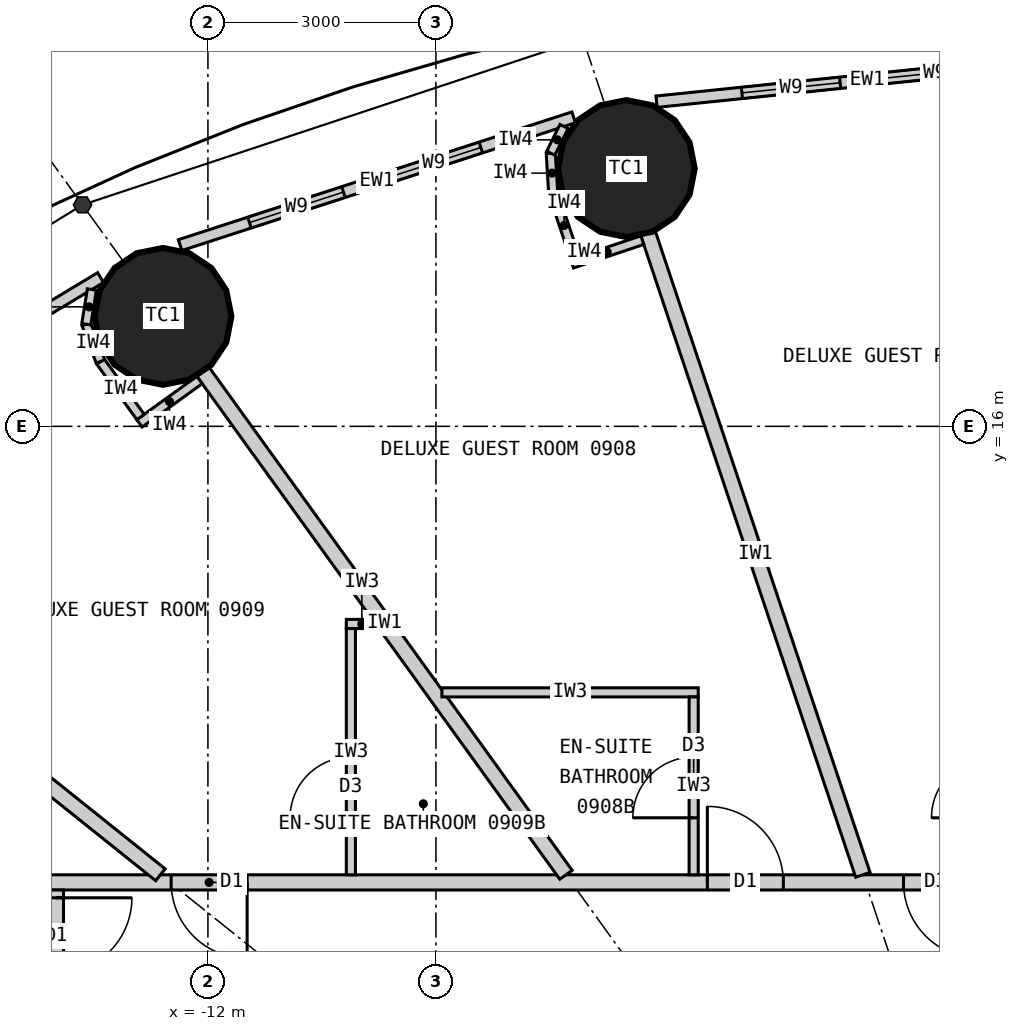
"""IFC4 building model, lengths in metres.
Left out: names, types, materials, properties, quantities, classifications, styles, units other than length and angle.
Written with IfcOpenShell. Run it as: python <this file> out.ifc"""

import sys

from ifc_helpers import new_model, si_unit, direction, frame, frame_2d, origin, origin_2d, place, context, subcontext, project, spatial, rectangle, circle, extrude, element, fill, save


model = new_model("IFC4")
c1 = context("Model", 3, precision=1e-05, world=origin(), true_north=direction((0.0, 1.0)))
c2 = subcontext(c1, "Body", "Model", "MODEL_VIEW")
j1 = project(units=[si_unit("LENGTHUNIT", "METRE"), si_unit("PLANEANGLEUNIT", "RADIAN")], contexts=[c1])
p1 = place(None, origin())
s1 = spatial("IfcSite", under=j1, at=p1, CompositionType="ELEMENT")
p2 = place(p1, origin())
s2 = spatial("IfcBuilding", under=s1, at=p2, CompositionType="ELEMENT")
p3 = place(p2, frame((0.0, 0.0, 42.6)))
s3 = spatial("IfcBuildingStorey", under=s2, at=p3, CompositionType="ELEMENT", Elevation=42.6)
for number, where, z_axis, x_axis in (
    (1, (-6.495, 19.391, 0.0), (0.0, 0.0, 1.0), (1.0, 0.0, 0.0)),
    (2, (-12.591, 17.447, 0.0), (0.0, 0.0, 1.0), (1.0, 0.0, 0.0)),
):
    element("IfcColumn", number, at=place(p3, frame(where, z_axis=z_axis, x_axis=x_axis)), inside=s3, PredefinedType="COLUMN", context=c2, shape_type="SweptSolid", body=[
        extrude(circle(Radius=0.9, at=origin_2d()), origin(), (0.0, 0.0, 1.0), 3.3),
    ])
p4 = place(p3, frame((-0.551, 20.843, 0.0), z_axis=(0.0, 0.0, 1.0), x_axis=(-0.994723735084, -0.102589915983, 0.0)))
e3 = element("IfcWall", 3, at=p4, inside=s3, PredefinedType="ELEMENTEDWALL", context=c2, shape_type="SweptSolid", body=[
    extrude(rectangle(XDim=5.576, YDim=0.15, at=frame_2d((2.788, 0.0))), origin(), (0.0, 0.0, 1.0), 3.05),
])
p5 = place(p4, frame((1.247, 0.0, 0.9)))
e4 = element("IfcOpeningElement", 4, at=p5, cuts=e3, PredefinedType="OPENING", context=c2, shape_type="SweptSolid", body=[
    extrude(rectangle(XDim=1.3, YDim=1.9, at=frame_2d((0.65, 0.95))), frame((0.0, 0.085, 0.0), z_axis=(0.0, -1.0, 0.0), x_axis=(1.0, 0.0, 0.0)), (0.0, 0.0, 1.0), 0.17),
])
p6 = place(p4, frame((3.147, 0.0, 0.9)))
e5 = element("IfcOpeningElement", 5, at=p6, cuts=e3, PredefinedType="OPENING", context=c2, shape_type="SweptSolid", body=[
    extrude(rectangle(XDim=1.3, YDim=1.9, at=frame_2d((0.65, 0.95))), frame((0.0, 0.085, 0.0), z_axis=(0.0, -1.0, 0.0), x_axis=(1.0, 0.0, 0.0)), (0.0, 0.0, 1.0), 0.17),
])
p7 = place(p3, frame((-7.188, 20.065, 0.0), z_axis=(0.0, 0.0, 1.0), x_axis=(-0.951138486029, -0.308764603532, 0.0)))
e6 = element("IfcWall", 6, at=p7, inside=s3, PredefinedType="ELEMENTEDWALL", context=c2, shape_type="SweptSolid", body=[
    extrude(rectangle(XDim=5.444, YDim=0.15, at=frame_2d((2.722, 0.0))), origin(), (0.0, 0.0, 1.0), 3.05),
])
p8 = place(p7, frame((1.284, 0.0, 0.9)))
e7 = element("IfcOpeningElement", 7, at=p8, cuts=e6, PredefinedType="OPENING", context=c2, shape_type="SweptSolid", body=[
    extrude(rectangle(XDim=1.3, YDim=1.9, at=frame_2d((0.65, 0.95))), frame((0.0, 0.085, 0.0), z_axis=(0.0, -1.0, 0.0), x_axis=(1.0, 0.0, 0.0)), (0.0, 0.0, 1.0), 0.17),
])
p9 = place(p7, frame((3.184, 0.0, 0.9)))
e8 = element("IfcOpeningElement", 8, at=p9, cuts=e6, PredefinedType="OPENING", context=c2, shape_type="SweptSolid", body=[
    extrude(rectangle(XDim=1.3, YDim=1.9, at=frame_2d((0.65, 0.95))), frame((0.0, 0.085, 0.0), z_axis=(0.0, -1.0, 0.0), x_axis=(1.0, 0.0, 0.0)), (0.0, 0.0, 1.0), 0.17),
])
p10 = place(p3, frame((-13.412, 17.957, 0.0), z_axis=(0.0, 0.0, 1.0), x_axis=(-0.856958191554, -0.515385931054, 0.0)))
e9 = element("IfcWall", 9, at=p10, inside=s3, PredefinedType="ELEMENTEDWALL", context=c2, shape_type="SweptSolid", body=[
    extrude(rectangle(XDim=5.201, YDim=0.15, at=frame_2d((2.601, 0.0))), origin(), (0.0, 0.0, 1.0), 3.05),
])
p11 = place(p10, frame((1.225, 0.0, 0.9)))
e10 = element("IfcOpeningElement", 10, at=p11, cuts=e9, PredefinedType="OPENING", context=c2, shape_type="SweptSolid", body=[
    extrude(rectangle(XDim=1.3, YDim=1.9, at=frame_2d((0.65, 0.95))), frame((0.0, 0.085, 0.0), z_axis=(0.0, -1.0, 0.0), x_axis=(1.0, 0.0, 0.0)), (0.0, 0.0, 1.0), 0.17),
])
p12 = place(p10, frame((3.125, 0.0, 0.9)))
e11 = element("IfcOpeningElement", 11, at=p12, cuts=e9, PredefinedType="OPENING", context=c2, shape_type="SweptSolid", body=[
    extrude(rectangle(XDim=1.3, YDim=1.9, at=frame_2d((0.65, 0.95))), frame((0.0, 0.085, 0.0), z_axis=(0.0, -1.0, 0.0), x_axis=(1.0, 0.0, 0.0)), (0.0, 0.0, 1.0), 0.17),
])
p13 = place(p3, frame((-14.1, 10.0, 0.0), z_axis=(0.0, 0.0, 1.0), x_axis=(1.0, 0.0, 0.0)))
e12 = element("IfcWall", 12, at=p13, inside=s3, PredefinedType="PARTITIONING", context=c2, shape_type="SweptSolid", body=[
    extrude(rectangle(XDim=28.2, YDim=0.2, at=frame_2d((14.1, 0.0))), origin(), (0.0, 0.0, 1.0), 3.05),
])
p14 = place(p13, frame((23.477, 0.0, 0.0)))
e13 = element("IfcOpeningElement", 13, at=p14, cuts=e12, PredefinedType="OPENING", context=c2, shape_type="SweptSolid", body=[
    extrude(rectangle(XDim=1.0, YDim=2.2, at=frame_2d((0.5, 1.1))), frame((0.0, 0.11, 0.0), z_axis=(0.0, -1.0, 0.0), x_axis=(1.0, 0.0, 0.0)), (0.0, 0.0, 1.0), 0.22),
])
p15 = place(p13, frame((18.529, 0.0, 0.0)))
e14 = element("IfcOpeningElement", 14, at=p15, cuts=e12, PredefinedType="OPENING", context=c2, shape_type="SweptSolid", body=[
    extrude(rectangle(XDim=1.0, YDim=2.2, at=frame_2d((0.5, 1.1))), frame((0.0, 0.11, 0.0), z_axis=(0.0, -1.0, 0.0), x_axis=(1.0, 0.0, 0.0)), (0.0, 0.0, 1.0), 0.22),
])
p16 = place(p13, frame((14.623, 0.0, 0.0)))
e15 = element("IfcOpeningElement", 15, at=p16, cuts=e12, PredefinedType="OPENING", context=c2, shape_type="SweptSolid", body=[
    extrude(rectangle(XDim=1.0, YDim=2.2, at=frame_2d((0.5, 1.1))), frame((0.0, 0.11, 0.0), z_axis=(0.0, -1.0, 0.0), x_axis=(1.0, 0.0, 0.0)), (0.0, 0.0, 1.0), 0.22),
])
p17 = place(p13, frame((11.252, 0.0, 0.0)))
e16 = element("IfcOpeningElement", 16, at=p17, cuts=e12, PredefinedType="OPENING", context=c2, shape_type="SweptSolid", body=[
    extrude(rectangle(XDim=1.0, YDim=2.1, at=frame_2d((0.5, 1.05))), frame((0.0, 0.11, 0.0), z_axis=(0.0, -1.0, 0.0), x_axis=(1.0, 0.0, 0.0)), (0.0, 0.0, 1.0), 0.22),
])
p18 = place(p13, frame((8.671, 0.0, 0.0)))
e17 = element("IfcOpeningElement", 17, at=p18, cuts=e12, PredefinedType="OPENING", context=c2, shape_type="SweptSolid", body=[
    extrude(rectangle(XDim=1.0, YDim=2.2, at=frame_2d((0.5, 1.1))), frame((0.0, 0.11, 0.0), z_axis=(0.0, -1.0, 0.0), x_axis=(1.0, 0.0, 0.0)), (0.0, 0.0, 1.0), 0.22),
])
p19 = place(p13, frame((1.616, 0.0, 0.0)))
e18 = element("IfcOpeningElement", 18, at=p19, cuts=e12, PredefinedType="OPENING", context=c2, shape_type="SweptSolid", body=[
    extrude(rectangle(XDim=1.0, YDim=2.2, at=frame_2d((0.5, 1.1))), frame((0.0, 0.11, 0.0), z_axis=(0.0, -1.0, 0.0), x_axis=(1.0, 0.0, 0.0)), (0.0, 0.0, 1.0), 0.22),
])
p20 = place(p3, frame((-14.0, 9.9, 0.0), z_axis=(0.0, 0.0, 1.0), x_axis=(0.0, -1.0, 0.0)))
e19 = element("IfcWall", 19, at=p20, inside=s3, PredefinedType="PARTITIONING", context=c2, shape_type="SweptSolid", body=[
    extrude(rectangle(XDim=19.8, YDim=0.2, at=frame_2d((9.9, 0.0))), origin(), (0.0, 0.0, 1.0), 3.05),
])
p21 = place(p20, frame((0.103, 0.0, 0.0)))
e20 = element("IfcOpeningElement", 20, at=p21, cuts=e19, PredefinedType="OPENING", context=c2, shape_type="SweptSolid", body=[
    extrude(rectangle(XDim=1.0, YDim=2.2, at=frame_2d((0.5, 1.1))), frame((0.0, 0.11, 0.0), z_axis=(0.0, -1.0, 0.0), x_axis=(1.0, 0.0, 0.0)), (0.0, 0.0, 1.0), 0.22),
])
p22 = place(p20, frame((5.252, 0.0, 0.0)))
e21 = element("IfcOpeningElement", 21, at=p22, cuts=e19, PredefinedType="OPENING", context=c2, shape_type="SweptSolid", body=[
    extrude(rectangle(XDim=1.0, YDim=2.0, at=frame_2d((0.5, 1.0))), frame((0.0, 0.11, 0.0), z_axis=(0.0, -1.0, 0.0), x_axis=(1.0, 0.0, 0.0)), (0.0, 0.0, 1.0), 0.22),
])
p23 = place(p20, frame((10.117, 0.0, 0.0)))
e22 = element("IfcOpeningElement", 22, at=p23, cuts=e19, PredefinedType="OPENING", context=c2, shape_type="SweptSolid", body=[
    extrude(rectangle(XDim=1.0, YDim=2.2, at=frame_2d((0.5, 1.1))), frame((0.0, 0.11, 0.0), z_axis=(0.0, -1.0, 0.0), x_axis=(1.0, 0.0, 0.0)), (0.0, 0.0, 1.0), 0.22),
])
p24 = place(p20, frame((13.247, 0.0, 0.0)))
e23 = element("IfcOpeningElement", 23, at=p24, cuts=e19, PredefinedType="OPENING", context=c2, shape_type="SweptSolid", body=[
    extrude(rectangle(XDim=1.0, YDim=2.0, at=frame_2d((0.5, 1.0))), frame((0.0, 0.11, 0.0), z_axis=(0.0, -1.0, 0.0), x_axis=(1.0, 0.0, 0.0)), (0.0, 0.0, 1.0), 0.22),
])
p25 = place(p20, frame((15.679, 0.0, 0.0)))
e24 = element("IfcOpeningElement", 24, at=p25, cuts=e19, PredefinedType="OPENING", context=c2, shape_type="SweptSolid", body=[
    extrude(rectangle(XDim=1.0, YDim=2.2, at=frame_2d((0.5, 1.1))), frame((0.0, 0.11, 0.0), z_axis=(0.0, -1.0, 0.0), x_axis=(1.0, 0.0, 0.0)), (0.0, 0.0, 1.0), 0.22),
])
p26 = place(p3, frame((-3.383, 10.1, 0.0), z_axis=(0.0, 0.0, 1.0), x_axis=(-0.317593727596, 0.948226884344, 0.0)))
e25 = element("IfcWall", 25, at=p26, inside=s3, PredefinedType="PARTITIONING", context=c2, shape_type="SweptSolid", body=[
    extrude(rectangle(XDim=8.899, YDim=0.2, at=frame_2d((4.449, 0.0))), origin(), (0.0, 0.0, 1.0), 2.15),
])
p27 = place(p3, frame((-7.289, 10.1, 0.0), z_axis=(0.0, 0.0, 1.0), x_axis=(-0.585216319319, 0.810877216108, 0.0)))
e26 = element("IfcWall", 26, at=p27, inside=s3, PredefinedType="PARTITIONING", context=c2, shape_type="SweptSolid", body=[
    extrude(rectangle(XDim=8.16, YDim=0.2, at=frame_2d((4.08, 0.0))), origin(), (0.0, 0.0, 1.0), 2.15),
])
p28 = place(p3, frame((-12.625, 10.1, 0.0), z_axis=(0.0, 0.0, 1.0), x_axis=(-0.780872884676, 0.624689953479, 0.0)))
e27 = element("IfcWall", 27, at=p28, inside=s3, PredefinedType="PARTITIONING", context=c2, shape_type="SweptSolid", body=[
    extrude(rectangle(XDim=5.845, YDim=0.2, at=frame_2d((2.922, 0.0))), origin(), (0.0, 0.0, 1.0), 2.15),
])
p29 = place(p3, frame((-8.921, 12.5, 0.0), z_axis=(0.0, 0.0, 1.0), x_axis=(1.0, 0.0, 0.0)))
e28 = element("IfcWall", 28, at=p29, inside=s3, PredefinedType="PARTITIONING", context=c2, shape_type="SweptSolid", body=[
    extrude(rectangle(XDim=3.372, YDim=0.12, at=frame_2d((1.686, 0.0))), origin(), (0.0, 0.0, 1.0), 3.05),
])
p30 = place(p3, frame((-5.609, 10.1, 0.0), z_axis=(0.0, 0.0, 1.0), x_axis=(0.0, 1.0, 0.0)))
e29 = element("IfcWall", 29, at=p30, inside=s3, PredefinedType="PARTITIONING", context=c2, shape_type="SweptSolid", body=[
    extrude(rectangle(XDim=2.34, YDim=0.12, at=frame_2d((1.17, 0.0))), origin(), (0.0, 0.0, 1.0), 3.05),
])
p31 = place(p30, frame((0.75, 0.0, 0.0)))
e30 = element("IfcOpeningElement", 30, at=p31, cuts=e29, PredefinedType="OPENING", context=c2, shape_type="SweptSolid", body=[
    extrude(rectangle(XDim=0.8, YDim=2.1, at=frame_2d((0.4, 1.05))), frame((0.0, 0.07, 0.0), z_axis=(0.0, -1.0, 0.0), x_axis=(1.0, 0.0, 0.0)), (0.0, 0.0, 1.0), 0.14),
])
p32 = place(p3, frame((-9.771, 13.4, 0.0), z_axis=(0.0, 0.0, 1.0), x_axis=(-1.0, 0.0, 0.0)))
e31 = element("IfcWall", 31, at=p32, inside=s3, PredefinedType="PARTITIONING", context=c2, shape_type="SweptSolid", body=[
    extrude(rectangle(XDim=0.408, YDim=0.12, at=frame_2d((0.204, 0.0))), origin(), (0.0, 0.0, 1.0), 3.05),
])
p33 = place(p3, frame((-10.119, 10.1, 0.0), z_axis=(0.0, 0.0, 1.0), x_axis=(0.0, 1.0, 0.0)))
e32 = element("IfcWall", 32, at=p33, inside=s3, PredefinedType="PARTITIONING", context=c2, shape_type="SweptSolid", body=[
    extrude(rectangle(XDim=3.24, YDim=0.12, at=frame_2d((1.62, 0.0))), origin(), (0.0, 0.0, 1.0), 3.05),
])
p34 = place(p33, frame((0.75, 0.0, 0.0)))
e33 = element("IfcOpeningElement", 33, at=p34, cuts=e32, PredefinedType="OPENING", context=c2, shape_type="SweptSolid", body=[
    extrude(rectangle(XDim=0.8, YDim=2.1, at=frame_2d((0.4, 1.05))), frame((0.0, 0.07, 0.0), z_axis=(0.0, -1.0, 0.0), x_axis=(1.0, 0.0, 0.0)), (0.0, 0.0, 1.0), 0.14),
])
p35 = place(p3, frame((-6.285, 18.449, 0.0), z_axis=(0.0, 0.0, 1.0), x_axis=(-0.948281677008, -0.317430088446, 0.0)))
e34 = element("IfcWall", 34, at=p35, inside=s3, PredefinedType="PARTITIONING", context=c2, shape_type="SweptSolid", body=[
    extrude(rectangle(XDim=0.974, YDim=0.12, at=frame_2d((0.487, 0.0))), origin(), (0.0, 0.0, 1.0), 3.05),
])
p36 = place(p3, frame((-7.171, 18.216, 0.0), z_axis=(0.0, 0.0, 1.0), x_axis=(-0.317692409458, 0.94819382669, 0.0)))
e35 = element("IfcWall", 35, at=p36, inside=s3, PredefinedType="PARTITIONING", context=c2, shape_type="SweptSolid", body=[
    extrude(rectangle(XDim=0.9, YDim=0.12, at=frame_2d((0.45, 0.0))), origin(), (0.0, 0.0, 1.0), 3.05),
])
p37 = place(p3, frame((-7.457, 19.069, 0.0), z_axis=(0.0, 0.0, 1.0), x_axis=(-0.061365267648, 0.99811537606, 0.0)))
e36 = element("IfcWall", 36, at=p37, inside=s3, PredefinedType="PARTITIONING", context=c2, shape_type="SweptSolid", body=[
    extrude(rectangle(XDim=0.525, YDim=0.12, at=frame_2d((0.263, 0.0))), origin(), (0.0, 0.0, 1.0), 3.05),
])
p38 = place(p3, frame((-7.489, 19.593, 0.0), z_axis=(0.0, 0.0, 1.0), x_axis=(0.446218959337, 0.89492381817, 0.0)))
e37 = element("IfcWall", 37, at=p38, inside=s3, PredefinedType="PARTITIONING", context=c2, shape_type="SweptSolid", body=[
    extrude(rectangle(XDim=0.393, YDim=0.12, at=frame_2d((0.196, 0.0))), origin(), (0.0, 0.0, 1.0), 3.05),
])
p39 = place(p3, frame((-12.11, 16.609, 0.0), z_axis=(0.0, 0.0, 1.0), x_axis=(-0.810897160646, -0.585188683123, 0.0)))
e38 = element("IfcWall", 38, at=p39, inside=s3, PredefinedType="PARTITIONING", context=c2, shape_type="SweptSolid", body=[
    extrude(rectangle(XDim=0.975, YDim=0.12, at=frame_2d((0.487, 0.0))), origin(), (0.0, 0.0, 1.0), 3.05),
])
p40 = place(p3, frame((-12.887, 16.123, 0.0), z_axis=(0.0, 0.0, 1.0), x_axis=(-0.585054732094, 0.810993810367, 0.0)))
e39 = element("IfcWall", 39, at=p40, inside=s3, PredefinedType="PARTITIONING", context=c2, shape_type="SweptSolid", body=[
    extrude(rectangle(XDim=0.9, YDim=0.12, at=frame_2d((0.45, 0.0))), origin(), (0.0, 0.0, 1.0), 3.05),
])
p41 = place(p3, frame((-13.414, 16.853, 0.0), z_axis=(0.0, 0.0, 1.0), x_axis=(-0.355705277023, 0.934598178844, 0.0)))
e40 = element("IfcWall", 40, at=p41, inside=s3, PredefinedType="PARTITIONING", context=c2, shape_type="SweptSolid", body=[
    extrude(rectangle(XDim=0.525, YDim=0.12, at=frame_2d((0.263, 0.0))), origin(), (0.0, 0.0, 1.0), 3.05),
])
p42 = place(p3, frame((-13.6, 17.344, 0.0), z_axis=(0.0, 0.0, 1.0), x_axis=(0.15994604532, 0.987125758243, 0.0)))
e41 = element("IfcWall", 41, at=p42, inside=s3, PredefinedType="PARTITIONING", context=c2, shape_type="SweptSolid", body=[
    extrude(rectangle(XDim=0.462, YDim=0.12, at=frame_2d((0.231, 0.0))), origin(), (0.0, 0.0, 1.0), 3.05),
])
p43 = place(p5, origin())
e42 = element("IfcWindow", 42, at=p43, inside=s3, PartitioningType="SINGLE_PANEL", PredefinedType="WINDOW", context=c2, shape_type="SweptSolid", body=[
    extrude(rectangle(XDim=1.3, YDim=1.9, at=frame_2d((0.65, 0.95))), frame((0.0, 0.03, 0.0), z_axis=(0.0, -1.0, 0.0), x_axis=(1.0, 0.0, 0.0)), (0.0, 0.0, 1.0), 0.06),
])
fill(e4, e42)
p44 = place(p6, origin())
e43 = element("IfcWindow", 43, at=p44, inside=s3, PartitioningType="SINGLE_PANEL", PredefinedType="WINDOW", context=c2, shape_type="SweptSolid", body=[
    extrude(rectangle(XDim=1.3, YDim=1.9, at=frame_2d((0.65, 0.95))), frame((0.0, 0.03, 0.0), z_axis=(0.0, -1.0, 0.0), x_axis=(1.0, 0.0, 0.0)), (0.0, 0.0, 1.0), 0.06),
])
fill(e5, e43)
p45 = place(p8, origin())
e44 = element("IfcWindow", 44, at=p45, inside=s3, PartitioningType="SINGLE_PANEL", PredefinedType="WINDOW", context=c2, shape_type="SweptSolid", body=[
    extrude(rectangle(XDim=1.3, YDim=1.9, at=frame_2d((0.65, 0.95))), frame((0.0, 0.03, 0.0), z_axis=(0.0, -1.0, 0.0), x_axis=(1.0, 0.0, 0.0)), (0.0, 0.0, 1.0), 0.06),
])
fill(e7, e44)
p46 = place(p9, origin())
e45 = element("IfcWindow", 45, at=p46, inside=s3, PartitioningType="SINGLE_PANEL", PredefinedType="WINDOW", context=c2, shape_type="SweptSolid", body=[
    extrude(rectangle(XDim=1.3, YDim=1.9, at=frame_2d((0.65, 0.95))), frame((0.0, 0.03, 0.0), z_axis=(0.0, -1.0, 0.0), x_axis=(1.0, 0.0, 0.0)), (0.0, 0.0, 1.0), 0.06),
])
fill(e8, e45)
p47 = place(p17, origin())
e46 = element("IfcDoor", 46, at=p47, inside=s3, OperationType="SINGLE_SWING_RIGHT", PredefinedType="DOOR", context=c2, shape_type="SweptSolid", body=[
    extrude(rectangle(XDim=1.0, YDim=2.1, at=frame_2d((0.5, 1.05))), frame((0.0, 0.025, 0.0), z_axis=(0.0, -1.0, 0.0), x_axis=(1.0, 0.0, 0.0)), (0.0, 0.0, 1.0), 0.05),
])
fill(e16, e46)
p48 = place(p31, origin())
e47 = element("IfcDoor", 47, at=p48, inside=s3, OperationType="SINGLE_SWING_LEFT", PredefinedType="DOOR", context=c2, shape_type="SweptSolid", body=[
    extrude(rectangle(XDim=0.8, YDim=2.1, at=frame_2d((0.4, 1.05))), frame((0.0, 0.025, 0.0), z_axis=(0.0, -1.0, 0.0), x_axis=(1.0, 0.0, 0.0)), (0.0, 0.0, 1.0), 0.05),
])
fill(e30, e47)
p49 = place(p18, origin())
e48 = element("IfcDoor", 48, at=p49, inside=s3, OperationType="SINGLE_SWING_LEFT", PredefinedType="DOOR", context=c2, shape_type="SweptSolid", body=[
    extrude(rectangle(XDim=1.0, YDim=2.2, at=frame_2d((0.5, 1.1))), frame((0.0, 0.025, 0.0), z_axis=(0.0, -1.0, 0.0), x_axis=(1.0, 0.0, 0.0)), (0.0, 0.0, 1.0), 0.05),
])
fill(e17, e48)
p50 = place(p34, origin())
e49 = element("IfcDoor", 49, at=p50, inside=s3, OperationType="SINGLE_SWING_LEFT", PredefinedType="DOOR", context=c2, shape_type="SweptSolid", body=[
    extrude(rectangle(XDim=0.8, YDim=2.1, at=frame_2d((0.4, 1.05))), frame((0.0, 0.025, 0.0), z_axis=(0.0, -1.0, 0.0), x_axis=(1.0, 0.0, 0.0)), (0.0, 0.0, 1.0), 0.05),
])
fill(e33, e49)
p51 = place(p19, origin())
e50 = element("IfcDoor", 50, at=p51, inside=s3, OperationType="SINGLE_SWING_RIGHT", PredefinedType="DOOR", context=c2, shape_type="SweptSolid", body=[
    extrude(rectangle(XDim=1.0, YDim=2.2, at=frame_2d((0.5, 1.1))), frame((0.0, 0.025, 0.0), z_axis=(0.0, -1.0, 0.0), x_axis=(1.0, 0.0, 0.0)), (0.0, 0.0, 1.0), 0.05),
])
fill(e18, e50)
p52 = place(p21, origin())
e51 = element("IfcDoor", 51, at=p52, inside=s3, OperationType="SINGLE_SWING_LEFT", PredefinedType="DOOR", context=c2, shape_type="SweptSolid", body=[
    extrude(rectangle(XDim=1.0, YDim=2.2, at=frame_2d((0.5, 1.1))), frame((0.0, 0.025, 0.0), z_axis=(0.0, -1.0, 0.0), x_axis=(1.0, 0.0, 0.0)), (0.0, 0.0, 1.0), 0.05),
])
fill(e20, e51)
save(model, sys.argv[1])
